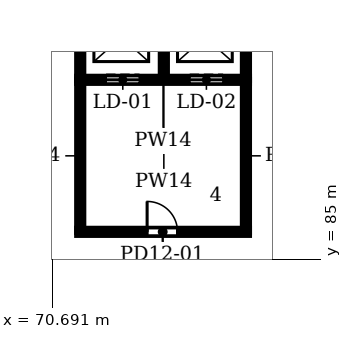
"""IFC4 building model, lengths in metres.
Left out: names, types, materials, properties, quantities, classifications, styles, units other than length and angle.
Written with IfcOpenShell. Run it as: python <this file> out.ifc"""

import sys

from ifc_helpers import new_model, si_unit, direction, frame, frame_2d, origin, place, context, subcontext, project, spatial, rectangle, extrude, element, fill, save


model = new_model("IFC4")
c1 = context("Model", 3, precision=1e-05, world=origin(), true_north=direction((0.0, 1.0)))
c2 = subcontext(c1, "Body", "Model", "MODEL_VIEW")
j1 = project(units=[si_unit("LENGTHUNIT", "METRE"), si_unit("PLANEANGLEUNIT", "RADIAN")], contexts=[c1])
p1 = place(None, origin())
s1 = spatial("IfcSite", under=j1, at=p1, CompositionType="ELEMENT")
p2 = place(p1, origin())
s2 = spatial("IfcBuilding", under=s1, at=p2, CompositionType="ELEMENT")
p3 = place(p2, frame((0.0, 0.0, -4.5)))
s3 = spatial("IfcBuildingStorey", under=s2, at=p3, CompositionType="ELEMENT", Elevation=-4.5)
p4 = place(p3, frame((71.5, 90.9, 0.0), z_axis=(0.0, 0.0, 1.0), x_axis=(1.0, 0.0, 0.0)))
e1 = element("IfcWall", 1, at=p4, inside=s3, PredefinedType="SOLIDWALL", context=c2, shape_type="SweptSolid", body=[
    extrude(rectangle(XDim=5.65, YDim=0.2, at=frame_2d((2.825, 0.0))), origin(), (0.0, 0.0, 1.0), 4.0),
])
p5 = place(p4, frame((0.95, 0.0, 0.0)))
e2 = element("IfcOpeningElement", 2, at=p5, cuts=e1, PredefinedType="OPENING", context=c2, shape_type="SweptSolid", body=[
    extrude(rectangle(XDim=1.1, YDim=2.1, at=frame_2d((0.55, 1.05))), frame((0.0, 0.11, 0.0), z_axis=(0.0, -1.0, 0.0), x_axis=(1.0, 0.0, 0.0)), (0.0, 0.0, 1.0), 0.22),
])
p6 = place(p4, frame((3.7, 0.0, 0.0)))
e3 = element("IfcOpeningElement", 3, at=p6, cuts=e1, PredefinedType="OPENING", context=c2, shape_type="SweptSolid", body=[
    extrude(rectangle(XDim=1.1, YDim=2.1, at=frame_2d((0.55, 1.05))), frame((0.0, 0.11, 0.0), z_axis=(0.0, -1.0, 0.0), x_axis=(1.0, 0.0, 0.0)), (0.0, 0.0, 1.0), 0.22),
])
for number, where, z_axis, x_axis in (
    (4, (71.6, 90.9, 0.0), (0.0, 0.0, 1.0), (0.0, 1.0, 0.0)),
    (5, (74.35, 90.9, 0.0), (0.0, 0.0, 1.0), (0.0, 1.0, 0.0)),
    (6, (77.05, 90.9, 0.0), (0.0, 0.0, 1.0), (0.0, 1.0, 0.0)),
):
    element("IfcWall", number, at=place(p3, frame(where, z_axis=z_axis, x_axis=x_axis)), inside=s3, PredefinedType="SOLIDWALL", context=c2, shape_type="SweptSolid", body=[
        extrude(rectangle(XDim=2.8, YDim=0.2, at=frame_2d((1.4, 0.0))), origin(), (0.0, 0.0, 1.0), 4.0),
    ])
for number, where, z_axis, x_axis in (
    (7, (71.6, 85.9, 0.0), (0.0, 0.0, 1.0), (0.0, 1.0, 0.0)),
    (8, (77.05, 85.9, 0.0), (0.0, 0.0, 1.0), (0.0, 1.0, 0.0)),
):
    element("IfcWall", number, at=place(p3, frame(where, z_axis=z_axis, x_axis=x_axis)), inside=s3, PredefinedType="PARTITIONING", context=c2, shape_type="SweptSolid", body=[
        extrude(rectangle(XDim=5.0, YDim=0.2, at=frame_2d((2.5, 0.0))), origin(), (0.0, 0.0, 1.0), 4.0),
    ])
p7 = place(p3, frame((71.5, 85.9, 0.0), z_axis=(0.0, 0.0, 1.0), x_axis=(1.0, 0.0, 0.0)))
e9 = element("IfcWall", 9, at=p7, inside=s3, PredefinedType="PARTITIONING", context=c2, shape_type="SweptSolid", body=[
    extrude(rectangle(XDim=5.65, YDim=0.2, at=frame_2d((2.825, 0.0))), origin(), (0.0, 0.0, 1.0), 4.0),
])
p8 = place(p7, frame((2.3, 0.0, 0.0)))
e10 = element("IfcOpeningElement", 10, at=p8, cuts=e9, PredefinedType="OPENING", context=c2, shape_type="SweptSolid", body=[
    extrude(rectangle(XDim=1.0, YDim=2.1, at=frame_2d((0.5, 1.05))), frame((0.0, 0.11, 0.0), z_axis=(0.0, -1.0, 0.0), x_axis=(1.0, 0.0, 0.0)), (0.0, 0.0, 1.0), 0.22),
])
p9 = place(p5, origin())
e11 = element("IfcDoor", 11, at=p9, inside=s3, OperationType="DOUBLE_DOOR_SLIDING", PredefinedType="DOOR", context=c2, shape_type="SweptSolid", body=[
    extrude(rectangle(XDim=1.1, YDim=2.1, at=frame_2d((0.55, 1.05))), frame((0.0, 0.025, 0.0), z_axis=(0.0, -1.0, 0.0), x_axis=(1.0, 0.0, 0.0)), (0.0, 0.0, 1.0), 0.05),
])
fill(e2, e11)
p10 = place(p6, origin())
e12 = element("IfcDoor", 12, at=p10, inside=s3, OperationType="DOUBLE_DOOR_SLIDING", PredefinedType="DOOR", context=c2, shape_type="SweptSolid", body=[
    extrude(rectangle(XDim=1.1, YDim=2.1, at=frame_2d((0.55, 1.05))), frame((0.0, 0.025, 0.0), z_axis=(0.0, -1.0, 0.0), x_axis=(1.0, 0.0, 0.0)), (0.0, 0.0, 1.0), 0.05),
])
fill(e3, e12)
p11 = place(p8, origin())
e13 = element("IfcDoor", 13, at=p11, inside=s3, OperationType="SINGLE_SWING_LEFT", PredefinedType="DOOR", context=c2, shape_type="SweptSolid", body=[
    extrude(rectangle(XDim=1.0, YDim=2.1, at=frame_2d((0.5, 1.05))), frame((0.0, 0.025, 0.0), z_axis=(0.0, -1.0, 0.0), x_axis=(1.0, 0.0, 0.0)), (0.0, 0.0, 1.0), 0.05),
])
fill(e10, e13)
save(model, sys.argv[1])
